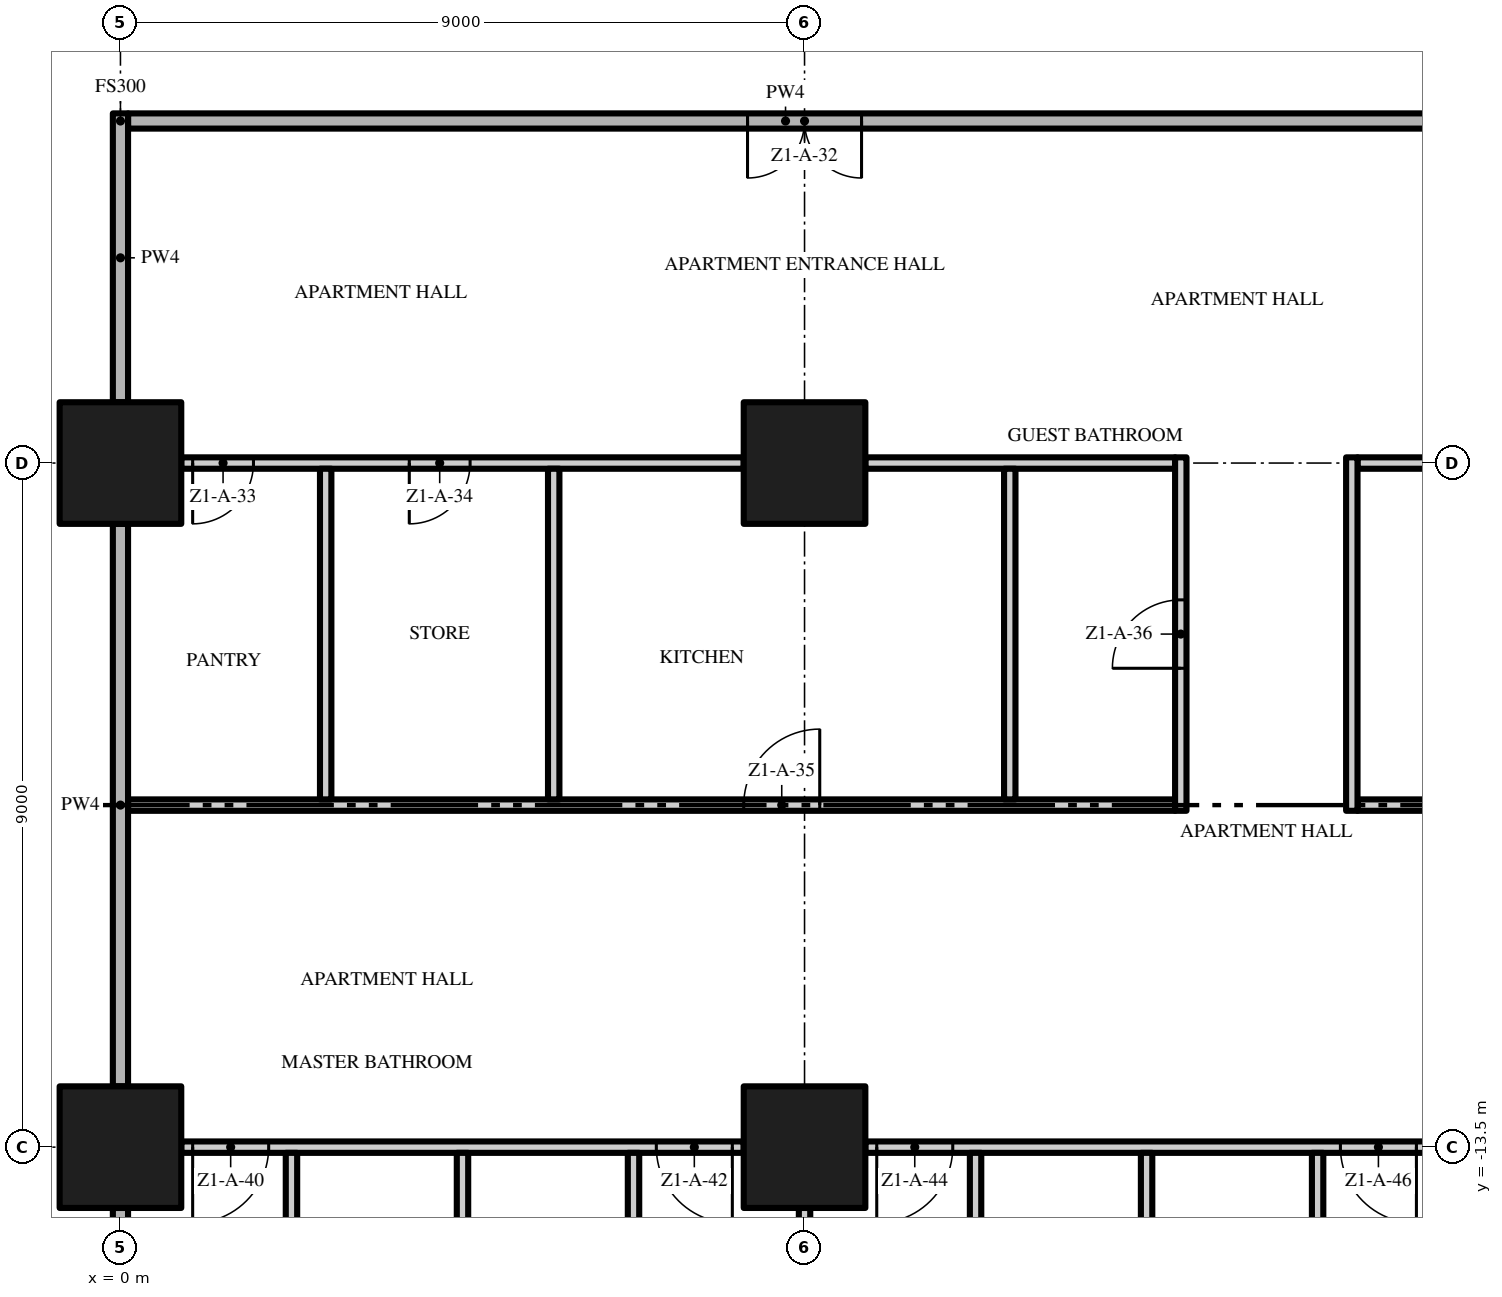
"""IFC4 building model, lengths in metres.
Left out: names, types, materials, properties, quantities, classifications, styles, units other than length and angle.
Written with IfcOpenShell. Run it as: python <this file> out.ifc"""

import sys

from ifc_helpers import new_model, si_unit, direction, frame, frame_2d, origin, origin_2d, place, context, subcontext, project, spatial, rectangle, extrude, element, fill, save


model = new_model("IFC4")
c1 = context("Model", 3, precision=1e-05, world=origin(), true_north=direction((0.0, 1.0)))
c2 = subcontext(c1, "Body", "Model", "MODEL_VIEW")
j1 = project(units=[si_unit("LENGTHUNIT", "METRE"), si_unit("PLANEANGLEUNIT", "RADIAN")], contexts=[c1])
p1 = place(None, origin())
s1 = spatial("IfcSite", under=j1, at=p1, CompositionType="ELEMENT")
p2 = place(p1, origin())
s2 = spatial("IfcBuilding", under=s1, at=p2, CompositionType="ELEMENT")
p3 = place(p2, frame((0.0, 0.0, 15.0)))
s3 = spatial("IfcBuildingStorey", under=s2, at=p3, CompositionType="ELEMENT", Elevation=15.0)
for number, where, z_axis, x_axis in (
    (1, (0.0, -13.5, 0.0), (0.0, 0.0, 1.0), (1.0, 0.0, 0.0)),
    (2, (0.0, -4.5, 0.0), (0.0, 0.0, 1.0), (1.0, 0.0, 0.0)),
    (3, (9.0, -13.5, 0.0), (0.0, 0.0, 1.0), (1.0, 0.0, 0.0)),
    (4, (9.0, -4.5, 0.0), (0.0, 0.0, 1.0), (1.0, 0.0, 0.0)),
):
    element("IfcColumn", number, at=place(p3, frame(where, z_axis=z_axis, x_axis=x_axis)), inside=s3, PredefinedType="COLUMN", context=c2, shape_type="SweptSolid", body=[
        extrude(rectangle(XDim=1.6, YDim=1.6, at=origin_2d()), origin(), (0.0, 0.0, 1.0), 3.5),
    ])
p4 = place(p3, frame((8.2, -13.5, 0.0), z_axis=(0.0, 0.0, 1.0), x_axis=(-1.0, 0.0, 0.0)))
e5 = element("IfcWall", 5, at=p4, inside=s3, PredefinedType="PARTITIONING", context=c2, shape_type="SweptSolid", body=[
    extrude(rectangle(XDim=7.4, YDim=0.15, at=frame_2d((3.7, 0.0))), origin(), (0.0, 0.0, 1.0), 3.5),
])
p5 = place(p4, frame((6.25, 0.0, 0.0)))
e6 = element("IfcOpeningElement", 6, at=p5, cuts=e5, PredefinedType="OPENING", context=c2, shape_type="SweptSolid", body=[
    extrude(rectangle(XDim=1.0, YDim=2.4, at=frame_2d((0.5, 1.2))), frame((0.0, 0.085, 0.0), z_axis=(0.0, -1.0, 0.0), x_axis=(1.0, 0.0, 0.0)), (0.0, 0.0, 1.0), 0.17),
])
p6 = place(p4, frame((0.15, 0.0, 0.0)))
e7 = element("IfcOpeningElement", 7, at=p6, cuts=e5, PredefinedType="OPENING", context=c2, shape_type="SweptSolid", body=[
    extrude(rectangle(XDim=1.0, YDim=2.4, at=frame_2d((0.5, 1.2))), frame((0.0, 0.085, 0.0), z_axis=(0.0, -1.0, 0.0), x_axis=(1.0, 0.0, 0.0)), (0.0, 0.0, 1.0), 0.17),
])
p7 = place(p3, frame((17.2, -13.5, 0.0), z_axis=(0.0, 0.0, 1.0), x_axis=(-1.0, 0.0, 0.0)))
e8 = element("IfcWall", 8, at=p7, inside=s3, PredefinedType="PARTITIONING", context=c2, shape_type="SweptSolid", body=[
    extrude(rectangle(XDim=7.4, YDim=0.15, at=frame_2d((3.7, 0.0))), origin(), (0.0, 0.0, 1.0), 3.5),
])
p8 = place(p7, frame((6.25, 0.0, 0.0)))
e9 = element("IfcOpeningElement", 9, at=p8, cuts=e8, PredefinedType="OPENING", context=c2, shape_type="SweptSolid", body=[
    extrude(rectangle(XDim=1.0, YDim=2.4, at=frame_2d((0.5, 1.2))), frame((0.0, 0.085, 0.0), z_axis=(0.0, -1.0, 0.0), x_axis=(1.0, 0.0, 0.0)), (0.0, 0.0, 1.0), 0.17),
])
p9 = place(p7, frame((0.15, 0.0, 0.0)))
e10 = element("IfcOpeningElement", 10, at=p9, cuts=e8, PredefinedType="OPENING", context=c2, shape_type="SweptSolid", body=[
    extrude(rectangle(XDim=1.0, YDim=2.4, at=frame_2d((0.5, 1.2))), frame((0.0, 0.085, 0.0), z_axis=(0.0, -1.0, 0.0), x_axis=(1.0, 0.0, 0.0)), (0.0, 0.0, 1.0), 0.17),
])
p10 = place(p3, frame((0.1, -9.0, 0.0), z_axis=(0.0, 0.0, 1.0), x_axis=(1.0, 0.0, 0.0)))
e11 = element("IfcWall", 11, at=p10, inside=s3, PredefinedType="PARTITIONING", context=c2, shape_type="SweptSolid", body=[
    extrude(rectangle(XDim=13.775, YDim=0.15, at=frame_2d((6.888, 0.0))), origin(), (0.0, 0.0, 1.0), 3.5),
])
p11 = place(p10, frame((8.1, 0.0, 0.0)))
e12 = element("IfcOpeningElement", 12, at=p11, cuts=e11, PredefinedType="OPENING", context=c2, shape_type="SweptSolid", body=[
    extrude(rectangle(XDim=1.0, YDim=2.4, at=frame_2d((0.5, 1.2))), frame((0.0, 0.085, 0.0), z_axis=(0.0, -1.0, 0.0), x_axis=(1.0, 0.0, 0.0)), (0.0, 0.0, 1.0), 0.17),
])
p12 = place(p3, frame((16.275, -9.0, 0.0), z_axis=(0.0, 0.0, 1.0), x_axis=(1.0, 0.0, 0.0)))
e13 = element("IfcWall", 13, at=p12, inside=s3, PredefinedType="PARTITIONING", context=c2, shape_type="SweptSolid", body=[
    extrude(rectangle(XDim=10.425, YDim=0.15, at=frame_2d((5.213, 0.0))), origin(), (0.0, 0.0, 1.0), 3.5),
])
p13 = place(p12, frame((9.425, 0.0, 0.0)))
e14 = element("IfcOpeningElement", 14, at=p13, cuts=e13, PredefinedType="OPENING", context=c2, shape_type="SweptSolid", body=[
    extrude(rectangle(XDim=0.8, YDim=2.0, at=frame_2d((0.4, 1.0))), frame((0.0, 0.085, 0.0), z_axis=(0.0, -1.0, 0.0), x_axis=(1.0, 0.0, 0.0)), (0.0, 0.0, 1.0), 0.17),
])
p14 = place(p3, frame((8.2, -4.5, 0.0), z_axis=(0.0, 0.0, 1.0), x_axis=(-1.0, 0.0, 0.0)))
e15 = element("IfcWall", 15, at=p14, inside=s3, PredefinedType="PARTITIONING", context=c2, shape_type="SweptSolid", body=[
    extrude(rectangle(XDim=7.4, YDim=0.15, at=frame_2d((3.7, 0.0))), origin(), (0.0, 0.0, 1.0), 3.5),
])
p15 = place(p14, frame((6.45, 0.0, 0.0)))
e16 = element("IfcOpeningElement", 16, at=p15, cuts=e15, PredefinedType="OPENING", context=c2, shape_type="SweptSolid", body=[
    extrude(rectangle(XDim=0.8, YDim=2.0, at=frame_2d((0.4, 1.0))), frame((0.0, 0.085, 0.0), z_axis=(0.0, -1.0, 0.0), x_axis=(1.0, 0.0, 0.0)), (0.0, 0.0, 1.0), 0.17),
])
p16 = place(p14, frame((3.6, 0.0, 0.0)))
e17 = element("IfcOpeningElement", 17, at=p16, cuts=e15, PredefinedType="OPENING", context=c2, shape_type="SweptSolid", body=[
    extrude(rectangle(XDim=0.8, YDim=2.0, at=frame_2d((0.4, 1.0))), frame((0.0, 0.085, 0.0), z_axis=(0.0, -1.0, 0.0), x_axis=(1.0, 0.0, 0.0)), (0.0, 0.0, 1.0), 0.17),
])
p17 = place(p3, frame((9.8, -4.5, 0.0), z_axis=(0.0, 0.0, 1.0), x_axis=(1.0, 0.0, 0.0)))
e18 = element("IfcWall", 18, at=p17, inside=s3, PredefinedType="PARTITIONING", context=c2, shape_type="SweptSolid", body=[
    extrude(rectangle(XDim=4.075, YDim=0.15, at=frame_2d((2.038, 0.0))), origin(), (0.0, 0.0, 1.0), 3.5),
])
p18 = place(p3, frame((16.275, -4.5, 0.0), z_axis=(0.0, 0.0, 1.0), x_axis=(1.0, 0.0, 0.0)))
e19 = element("IfcWall", 19, at=p18, inside=s3, PredefinedType="PARTITIONING", context=c2, shape_type="SweptSolid", body=[
    extrude(rectangle(XDim=0.925, YDim=0.15, at=frame_2d((0.463, 0.0))), origin(), (0.0, 0.0, 1.0), 3.5),
])
p19 = place(p3, frame((17.4, 0.0, 0.0), z_axis=(0.0, 0.0, 1.0), x_axis=(-1.0, 0.0, 0.0)))
e20 = element("IfcWall", 20, at=p19, inside=s3, PredefinedType="PARTITIONING", context=c2, shape_type="SweptSolid", body=[
    extrude(rectangle(XDim=17.3, YDim=0.2, at=frame_2d((8.65, 0.0))), origin(), (0.0, 0.0, 1.0), 3.5),
])
p20 = place(p19, frame((7.65, 0.0, 0.0)))
e21 = element("IfcOpeningElement", 21, at=p20, cuts=e20, PredefinedType="OPENING", context=c2, shape_type="SweptSolid", body=[
    extrude(rectangle(XDim=1.5, YDim=2.4, at=frame_2d((0.75, 1.2))), frame((0.0, 0.11, 0.0), z_axis=(0.0, -1.0, 0.0), x_axis=(1.0, 0.0, 0.0)), (0.0, 0.0, 1.0), 0.22),
])
p21 = place(p3, frame((0.0, -21.0, 0.0), z_axis=(0.0, 0.0, 1.0), x_axis=(0.0, 1.0, 0.0)))
e22 = element("IfcWall", 22, at=p21, inside=s3, PredefinedType="PARTITIONING", context=c2, shape_type="SweptSolid", body=[
    extrude(rectangle(XDim=6.7, YDim=0.2, at=frame_2d((3.35, 0.0))), origin(), (0.0, 0.0, 1.0), 3.5),
])
p22 = place(p3, frame((0.0, -12.7, 0.0), z_axis=(0.0, 0.0, 1.0), x_axis=(0.0, 1.0, 0.0)))
e23 = element("IfcWall", 23, at=p22, inside=s3, PredefinedType="PARTITIONING", context=c2, shape_type="SweptSolid", body=[
    extrude(rectangle(XDim=7.4, YDim=0.2, at=frame_2d((3.7, 0.0))), origin(), (0.0, 0.0, 1.0), 3.5),
])
p23 = place(p3, frame((0.0, -3.7, 0.0), z_axis=(0.0, 0.0, 1.0), x_axis=(0.0, 1.0, 0.0)))
e24 = element("IfcWall", 24, at=p23, inside=s3, PredefinedType="PARTITIONING", context=c2, shape_type="SweptSolid", body=[
    extrude(rectangle(XDim=3.8, YDim=0.2, at=frame_2d((1.9, 0.0))), origin(), (0.0, 0.0, 1.0), 3.5),
])
p24 = place(p3, frame((2.25, -16.575, 0.0), z_axis=(0.0, 0.0, 1.0), x_axis=(0.0, 1.0, 0.0)))
e25 = element("IfcWall", 25, at=p24, inside=s3, PredefinedType="PARTITIONING", context=c2, shape_type="SweptSolid", body=[
    extrude(rectangle(XDim=3.0, YDim=0.15, at=frame_2d((1.5, 0.0))), origin(), (0.0, 0.0, 1.0), 3.5),
])
p25 = place(p3, frame((2.7, -8.925, 0.0), z_axis=(0.0, 0.0, 1.0), x_axis=(0.0, 1.0, 0.0)))
e26 = element("IfcWall", 26, at=p25, inside=s3, PredefinedType="PARTITIONING", context=c2, shape_type="SweptSolid", body=[
    extrude(rectangle(XDim=4.35, YDim=0.15, at=frame_2d((2.175, 0.0))), origin(), (0.0, 0.0, 1.0), 3.5),
])
p26 = place(p3, frame((4.5, -22.2, 0.0), z_axis=(0.0, 0.0, 1.0), x_axis=(0.0, 1.0, 0.0)))
e27 = element("IfcWall", 27, at=p26, inside=s3, PredefinedType="PARTITIONING", context=c2, shape_type="SweptSolid", body=[
    extrude(rectangle(XDim=8.625, YDim=0.15, at=frame_2d((4.312, 0.0))), origin(), (0.0, 0.0, 1.0), 3.5),
])
p27 = place(p3, frame((5.7, -8.925, 0.0), z_axis=(0.0, 0.0, 1.0), x_axis=(0.0, 1.0, 0.0)))
e28 = element("IfcWall", 28, at=p27, inside=s3, PredefinedType="PARTITIONING", context=c2, shape_type="SweptSolid", body=[
    extrude(rectangle(XDim=4.35, YDim=0.15, at=frame_2d((2.175, 0.0))), origin(), (0.0, 0.0, 1.0), 3.5),
])
p28 = place(p3, frame((6.75, -16.575, 0.0), z_axis=(0.0, 0.0, 1.0), x_axis=(0.0, 1.0, 0.0)))
e29 = element("IfcWall", 29, at=p28, inside=s3, PredefinedType="PARTITIONING", context=c2, shape_type="SweptSolid", body=[
    extrude(rectangle(XDim=3.0, YDim=0.15, at=frame_2d((1.5, 0.0))), origin(), (0.0, 0.0, 1.0), 3.5),
])
p29 = place(p3, frame((9.0, -21.0, 0.0), z_axis=(0.0, 0.0, 1.0), x_axis=(0.0, 1.0, 0.0)))
e30 = element("IfcWall", 30, at=p29, inside=s3, PredefinedType="PARTITIONING", context=c2, shape_type="SweptSolid", body=[
    extrude(rectangle(XDim=6.7, YDim=0.15, at=frame_2d((3.35, 0.0))), origin(), (0.0, 0.0, 1.0), 3.5),
])
p30 = place(p3, frame((11.25, -16.575, 0.0), z_axis=(0.0, 0.0, 1.0), x_axis=(0.0, 1.0, 0.0)))
e31 = element("IfcWall", 31, at=p30, inside=s3, PredefinedType="PARTITIONING", context=c2, shape_type="SweptSolid", body=[
    extrude(rectangle(XDim=3.0, YDim=0.15, at=frame_2d((1.5, 0.0))), origin(), (0.0, 0.0, 1.0), 3.5),
])
p31 = place(p3, frame((11.7, -8.925, 0.0), z_axis=(0.0, 0.0, 1.0), x_axis=(0.0, 1.0, 0.0)))
e32 = element("IfcWall", 32, at=p31, inside=s3, PredefinedType="PARTITIONING", context=c2, shape_type="SweptSolid", body=[
    extrude(rectangle(XDim=4.35, YDim=0.15, at=frame_2d((2.175, 0.0))), origin(), (0.0, 0.0, 1.0), 3.5),
])
p32 = place(p3, frame((13.5, -22.2, 0.0), z_axis=(0.0, 0.0, 1.0), x_axis=(0.0, 1.0, 0.0)))
e33 = element("IfcWall", 33, at=p32, inside=s3, PredefinedType="PARTITIONING", context=c2, shape_type="SweptSolid", body=[
    extrude(rectangle(XDim=8.625, YDim=0.15, at=frame_2d((4.312, 0.0))), origin(), (0.0, 0.0, 1.0), 3.5),
])
p33 = place(p3, frame((13.95, -9.075, 0.0), z_axis=(0.0, 0.0, 1.0), x_axis=(0.0, 1.0, 0.0)))
e34 = element("IfcWall", 34, at=p33, inside=s3, PredefinedType="PARTITIONING", context=c2, shape_type="SweptSolid", body=[
    extrude(rectangle(XDim=4.65, YDim=0.15, at=frame_2d((2.325, 0.0))), origin(), (0.0, 0.0, 1.0), 3.5),
])
p34 = place(p33, frame((1.875, 0.0, 0.0)))
e35 = element("IfcOpeningElement", 35, at=p34, cuts=e34, PredefinedType="OPENING", context=c2, shape_type="SweptSolid", body=[
    extrude(rectangle(XDim=0.9, YDim=2.1, at=frame_2d((0.45, 1.05))), frame((0.0, 0.085, 0.0), z_axis=(0.0, -1.0, 0.0), x_axis=(1.0, 0.0, 0.0)), (0.0, 0.0, 1.0), 0.17),
])
p35 = place(p3, frame((15.75, -16.575, 0.0), z_axis=(0.0, 0.0, 1.0), x_axis=(0.0, 1.0, 0.0)))
e36 = element("IfcWall", 36, at=p35, inside=s3, PredefinedType="PARTITIONING", context=c2, shape_type="SweptSolid", body=[
    extrude(rectangle(XDim=3.0, YDim=0.15, at=frame_2d((1.5, 0.0))), origin(), (0.0, 0.0, 1.0), 3.5),
])
p36 = place(p3, frame((16.2, -9.075, 0.0), z_axis=(0.0, 0.0, 1.0), x_axis=(0.0, 1.0, 0.0)))
e37 = element("IfcWall", 37, at=p36, inside=s3, PredefinedType="PARTITIONING", context=c2, shape_type="SweptSolid", body=[
    extrude(rectangle(XDim=4.65, YDim=0.15, at=frame_2d((2.325, 0.0))), origin(), (0.0, 0.0, 1.0), 3.5),
])
p37 = place(p20, origin())
e38 = element("IfcDoor", 38, at=p37, inside=s3, OperationType="DOUBLE_DOOR_SINGLE_SWING", PredefinedType="DOOR", context=c2, shape_type="SweptSolid", body=[
    extrude(rectangle(XDim=1.5, YDim=2.4, at=frame_2d((0.75, 1.2))), frame((0.0, 0.025, 0.0), z_axis=(0.0, -1.0, 0.0), x_axis=(1.0, 0.0, 0.0)), (0.0, 0.0, 1.0), 0.05),
])
fill(e21, e38)
p38 = place(p15, origin())
e39 = element("IfcDoor", 39, at=p38, inside=s3, OperationType="SINGLE_SWING_RIGHT", PredefinedType="DOOR", context=c2, shape_type="SweptSolid", body=[
    extrude(rectangle(XDim=0.8, YDim=2.0, at=frame_2d((0.4, 1.0))), frame((0.0, 0.025, 0.0), z_axis=(0.0, -1.0, 0.0), x_axis=(1.0, 0.0, 0.0)), (0.0, 0.0, 1.0), 0.05),
])
fill(e16, e39)
p39 = place(p16, origin())
e40 = element("IfcDoor", 40, at=p39, inside=s3, OperationType="SINGLE_SWING_RIGHT", PredefinedType="DOOR", context=c2, shape_type="SweptSolid", body=[
    extrude(rectangle(XDim=0.8, YDim=2.0, at=frame_2d((0.4, 1.0))), frame((0.0, 0.025, 0.0), z_axis=(0.0, -1.0, 0.0), x_axis=(1.0, 0.0, 0.0)), (0.0, 0.0, 1.0), 0.05),
])
fill(e17, e40)
p40 = place(p11, origin())
e41 = element("IfcDoor", 41, at=p40, inside=s3, OperationType="SINGLE_SWING_RIGHT", PredefinedType="DOOR", context=c2, shape_type="SweptSolid", body=[
    extrude(rectangle(XDim=1.0, YDim=2.4, at=frame_2d((0.5, 1.2))), frame((0.0, 0.025, 0.0), z_axis=(0.0, -1.0, 0.0), x_axis=(1.0, 0.0, 0.0)), (0.0, 0.0, 1.0), 0.05),
])
fill(e12, e41)
p41 = place(p34, origin())
e42 = element("IfcDoor", 42, at=p41, inside=s3, OperationType="SINGLE_SWING_LEFT", PredefinedType="DOOR", context=c2, shape_type="SweptSolid", body=[
    extrude(rectangle(XDim=0.9, YDim=2.1, at=frame_2d((0.45, 1.05))), frame((0.0, 0.025, 0.0), z_axis=(0.0, -1.0, 0.0), x_axis=(1.0, 0.0, 0.0)), (0.0, 0.0, 1.0), 0.05),
])
fill(e35, e42)
p42 = place(p5, origin())
e43 = element("IfcDoor", 43, at=p42, inside=s3, OperationType="SINGLE_SWING_RIGHT", PredefinedType="DOOR", context=c2, shape_type="SweptSolid", body=[
    extrude(rectangle(XDim=1.0, YDim=2.4, at=frame_2d((0.5, 1.2))), frame((0.0, 0.025, 0.0), z_axis=(0.0, -1.0, 0.0), x_axis=(1.0, 0.0, 0.0)), (0.0, 0.0, 1.0), 0.05),
])
fill(e6, e43)
p43 = place(p6, origin())
e44 = element("IfcDoor", 44, at=p43, inside=s3, OperationType="SINGLE_SWING_LEFT", PredefinedType="DOOR", context=c2, shape_type="SweptSolid", body=[
    extrude(rectangle(XDim=1.0, YDim=2.4, at=frame_2d((0.5, 1.2))), frame((0.0, 0.025, 0.0), z_axis=(0.0, -1.0, 0.0), x_axis=(1.0, 0.0, 0.0)), (0.0, 0.0, 1.0), 0.05),
])
fill(e7, e44)
p44 = place(p8, origin())
e45 = element("IfcDoor", 45, at=p44, inside=s3, OperationType="SINGLE_SWING_RIGHT", PredefinedType="DOOR", context=c2, shape_type="SweptSolid", body=[
    extrude(rectangle(XDim=1.0, YDim=2.4, at=frame_2d((0.5, 1.2))), frame((0.0, 0.025, 0.0), z_axis=(0.0, -1.0, 0.0), x_axis=(1.0, 0.0, 0.0)), (0.0, 0.0, 1.0), 0.05),
])
fill(e9, e45)
p45 = place(p9, origin())
e46 = element("IfcDoor", 46, at=p45, inside=s3, OperationType="SINGLE_SWING_LEFT", PredefinedType="DOOR", context=c2, shape_type="SweptSolid", body=[
    extrude(rectangle(XDim=1.0, YDim=2.4, at=frame_2d((0.5, 1.2))), frame((0.0, 0.025, 0.0), z_axis=(0.0, -1.0, 0.0), x_axis=(1.0, 0.0, 0.0)), (0.0, 0.0, 1.0), 0.05),
])
fill(e10, e46)
save(model, sys.argv[1])
